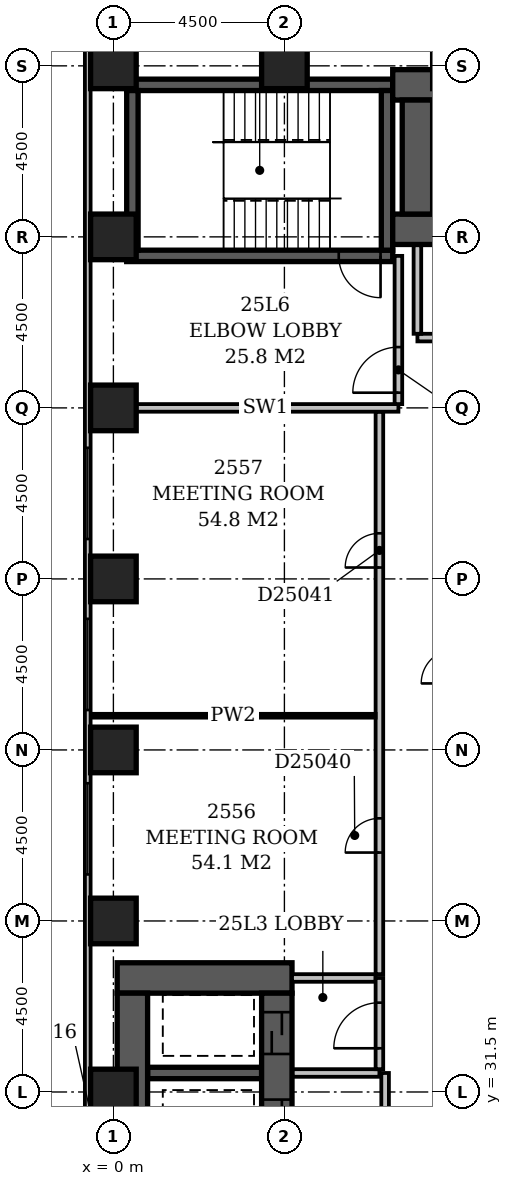
"""IFC4 building model, lengths in metres.
Left out: names, types, materials, properties, quantities, classifications, styles, units other than length and angle.
Written with IfcOpenShell. Run it as: python <this file> out.ifc"""

import sys

from ifc_helpers import new_model, si_unit, direction, frame, frame_2d, origin, origin_2d, place, context, subcontext, project, spatial, rectangle, extrude, element, fill, save


model = new_model("IFC4")
c1 = context("Model", 3, precision=1e-05, world=origin(), true_north=direction((0.0, 1.0)))
c2 = subcontext(c1, "Body", "Model", "MODEL_VIEW")
j1 = project(units=[si_unit("LENGTHUNIT", "METRE"), si_unit("PLANEANGLEUNIT", "RADIAN")], contexts=[c1])
p1 = place(None, origin())
s1 = spatial("IfcSite", under=j1, at=p1, CompositionType="ELEMENT")
p2 = place(p1, origin())
s2 = spatial("IfcBuilding", under=s1, at=p2, CompositionType="ELEMENT")
p3 = place(p2, frame((0.0, 0.0, 101.0)))
s3 = spatial("IfcBuildingStorey", under=s2, at=p3, CompositionType="ELEMENT", Elevation=101.0)
p4 = place(p3, frame((0.1, 34.5, -0.3), z_axis=(0.0, 0.0, 1.0), x_axis=(1.0, 0.0, 0.0)))
e1 = element("IfcWall", 1, at=p4, inside=s3, PredefinedType="SHEAR", context=c2, shape_type="SweptSolid", body=[
    extrude(rectangle(XDim=4.6, YDim=0.8, at=frame_2d((2.3, 0.0))), origin(), (0.0, 0.0, 1.0), 3.6),
])
p5 = place(p3, frame((0.35, 53.5, -0.3), z_axis=(0.0, 0.0, 1.0), x_axis=(1.0, 0.0, 0.0)))
e2 = element("IfcWall", 2, at=p5, inside=s3, PredefinedType="SHEAR", context=c2, shape_type="SweptSolid", body=[
    extrude(rectangle(XDim=7.0, YDim=0.3, at=frame_2d((3.5, 0.0))), origin(), (0.0, 0.0, 1.0), 3.6),
])
p6 = place(p5, frame((5.58, 0.0, 0.3)))
e3 = element("IfcOpeningElement", 3, at=p6, cuts=e2, PredefinedType="OPENING", context=c2, shape_type="SweptSolid", body=[
    extrude(rectangle(XDim=1.1, YDim=2.1, at=frame_2d((0.55, 1.05))), frame((0.0, 0.162, 0.0), z_axis=(0.0, -1.0, 0.0), x_axis=(1.0, 0.0, 0.0)), (0.0, 0.0, 1.0), 0.324),
])
p7 = place(p3, frame((0.35, 58.0, -0.3), z_axis=(0.0, 0.0, 1.0), x_axis=(1.0, 0.0, 0.0)))
e4 = element("IfcWall", 4, at=p7, inside=s3, PredefinedType="SHEAR", context=c2, shape_type="SweptSolid", body=[
    extrude(rectangle(XDim=7.0, YDim=0.3, at=frame_2d((3.5, 0.0))), origin(), (0.0, 0.0, 1.0), 3.6),
])
p8 = place(p3, frame((0.5, 27.15, -0.3), z_axis=(0.0, 0.0, 1.0), x_axis=(0.0, 1.0, 0.0)))
e5 = element("IfcWall", 5, at=p8, inside=s3, PredefinedType="SHEAR", context=c2, shape_type="SweptSolid", body=[
    extrude(rectangle(XDim=6.95, YDim=0.8, at=frame_2d((3.475, 0.0))), origin(), (0.0, 0.0, 1.0), 3.6),
])
p9 = place(p3, frame((0.5, 53.65, -0.3), z_axis=(0.0, 0.0, 1.0), x_axis=(0.0, 1.0, 0.0)))
e6 = element("IfcWall", 6, at=p9, inside=s3, PredefinedType="SHEAR", context=c2, shape_type="SweptSolid", body=[
    extrude(rectangle(XDim=4.2, YDim=0.3, at=frame_2d((2.1, 0.0))), origin(), (0.0, 0.0, 1.0), 3.6),
])
p10 = place(p3, frame((0.9, 32.0, -0.3), z_axis=(0.0, 0.0, 1.0), x_axis=(1.0, 0.0, 0.0)))
e7 = element("IfcWall", 7, at=p10, inside=s3, PredefinedType="SHEAR", context=c2, shape_type="SweptSolid", body=[
    extrude(rectangle(XDim=3.0, YDim=0.3, at=frame_2d((1.5, 0.0))), origin(), (0.0, 0.0, 1.0), 3.6),
])
p11 = place(p3, frame((4.3, 27.15, -0.3), z_axis=(0.0, 0.0, 1.0), x_axis=(0.0, 1.0, 0.0)))
e8 = element("IfcWall", 8, at=p11, inside=s3, PredefinedType="SHEAR", context=c2, shape_type="SweptSolid", body=[
    extrude(rectangle(XDim=6.95, YDim=0.8, at=frame_2d((3.475, 0.0))), origin(), (0.0, 0.0, 1.0), 3.6),
])
p12 = place(p11, frame((3.05, 0.0, 0.3)))
e9 = element("IfcOpeningElement", 9, at=p12, cuts=e8, PredefinedType="OPENING", context=c2, shape_type="SweptSolid", body=[
    extrude(rectangle(XDim=1.1, YDim=2.1, at=frame_2d((0.55, 1.05))), frame((0.0, 0.412, 0.0), z_axis=(0.0, -1.0, 0.0), x_axis=(1.0, 0.0, 0.0)), (0.0, 0.0, 1.0), 0.824),
])
p13 = place(p11, frame((0.55, 0.0, 0.3)))
e10 = element("IfcOpeningElement", 10, at=p13, cuts=e8, PredefinedType="OPENING", context=c2, shape_type="SweptSolid", body=[
    extrude(rectangle(XDim=1.1, YDim=2.1, at=frame_2d((0.55, 1.05))), frame((0.0, 0.412, 0.0), z_axis=(0.0, -1.0, 0.0), x_axis=(1.0, 0.0, 0.0)), (0.0, 0.0, 1.0), 0.824),
])
p14 = place(p11, frame((5.35, 0.0, 0.3)))
e11 = element("IfcOpeningElement", 11, at=p14, cuts=e8, PredefinedType="OPENING", context=c2, shape_type="SweptSolid", body=[
    extrude(rectangle(XDim=1.1, YDim=2.1, at=frame_2d((0.55, 1.05))), frame((0.0, 0.412, 0.0), z_axis=(0.0, -1.0, 0.0), x_axis=(1.0, 0.0, 0.0)), (0.0, 0.0, 1.0), 0.824),
])
p15 = place(p3, frame((7.2, 53.65, -0.3), z_axis=(0.0, 0.0, 1.0), x_axis=(0.0, 1.0, 0.0)))
e12 = element("IfcWall", 12, at=p15, inside=s3, PredefinedType="SHEAR", context=c2, shape_type="SweptSolid", body=[
    extrude(rectangle(XDim=4.2, YDim=0.3, at=frame_2d((2.1, 0.0))), origin(), (0.0, 0.0, 1.0), 3.6),
])
p16 = place(p3, frame((7.35, 54.2, -0.3), z_axis=(0.0, 0.0, 1.0), x_axis=(1.0, 0.0, 0.0)))
e13 = element("IfcWall", 13, at=p16, inside=s3, PredefinedType="SHEAR", context=c2, shape_type="SweptSolid", body=[
    extrude(rectangle(XDim=16.45, YDim=0.8, at=frame_2d((8.225, 0.0))), origin(), (0.0, 0.0, 1.0), 3.6),
])
p17 = place(p16, frame((1.35, 0.0, 0.3)))
e14 = element("IfcOpeningElement", 14, at=p17, cuts=e13, PredefinedType="OPENING", context=c2, shape_type="SweptSolid", body=[
    extrude(rectangle(XDim=1.1, YDim=2.1, at=frame_2d((0.55, 1.05))), frame((0.0, 0.412, 0.0), z_axis=(0.0, -1.0, 0.0), x_axis=(1.0, 0.0, 0.0)), (0.0, 0.0, 1.0), 0.824),
])
p18 = place(p16, frame((3.85, 0.0, 0.3)))
e15 = element("IfcOpeningElement", 15, at=p18, cuts=e13, PredefinedType="OPENING", context=c2, shape_type="SweptSolid", body=[
    extrude(rectangle(XDim=1.1, YDim=2.1, at=frame_2d((0.55, 1.05))), frame((0.0, 0.412, 0.0), z_axis=(0.0, -1.0, 0.0), x_axis=(1.0, 0.0, 0.0)), (0.0, 0.0, 1.0), 0.824),
])
p19 = place(p16, frame((6.35, 0.0, 0.3)))
e16 = element("IfcOpeningElement", 16, at=p19, cuts=e13, PredefinedType="OPENING", context=c2, shape_type="SweptSolid", body=[
    extrude(rectangle(XDim=1.1, YDim=2.1, at=frame_2d((0.55, 1.05))), frame((0.0, 0.412, 0.0), z_axis=(0.0, -1.0, 0.0), x_axis=(1.0, 0.0, 0.0)), (0.0, 0.0, 1.0), 0.824),
])
p20 = place(p16, frame((8.85, 0.0, 0.3)))
e17 = element("IfcOpeningElement", 17, at=p20, cuts=e13, PredefinedType="OPENING", context=c2, shape_type="SweptSolid", body=[
    extrude(rectangle(XDim=1.1, YDim=2.1, at=frame_2d((0.55, 1.05))), frame((0.0, 0.412, 0.0), z_axis=(0.0, -1.0, 0.0), x_axis=(1.0, 0.0, 0.0)), (0.0, 0.0, 1.0), 0.824),
])
p21 = place(p16, frame((11.35, 0.0, 0.3)))
e18 = element("IfcOpeningElement", 18, at=p21, cuts=e13, PredefinedType="OPENING", context=c2, shape_type="SweptSolid", body=[
    extrude(rectangle(XDim=1.1, YDim=2.1, at=frame_2d((0.55, 1.05))), frame((0.0, 0.412, 0.0), z_axis=(0.0, -1.0, 0.0), x_axis=(1.0, 0.0, 0.0)), (0.0, 0.0, 1.0), 0.824),
])
p22 = place(p16, frame((13.85, 0.0, 0.3)))
e19 = element("IfcOpeningElement", 19, at=p22, cuts=e13, PredefinedType="OPENING", context=c2, shape_type="SweptSolid", body=[
    extrude(rectangle(XDim=1.1, YDim=2.1, at=frame_2d((0.55, 1.05))), frame((0.0, 0.412, 0.0), z_axis=(0.0, -1.0, 0.0), x_axis=(1.0, 0.0, 0.0)), (0.0, 0.0, 1.0), 0.824),
])
p23 = place(p3, frame((7.35, 58.0, -0.3), z_axis=(0.0, 0.0, 1.0), x_axis=(1.0, 0.0, 0.0)))
e20 = element("IfcWall", 20, at=p23, inside=s3, PredefinedType="SHEAR", context=c2, shape_type="SweptSolid", body=[
    extrude(rectangle(XDim=16.45, YDim=0.8, at=frame_2d((8.225, 0.0))), origin(), (0.0, 0.0, 1.0), 3.6),
])
p24 = place(p3, frame((8.0, 54.6, -0.3), z_axis=(0.0, 0.0, 1.0), x_axis=(0.0, 1.0, 0.0)))
e21 = element("IfcWall", 21, at=p24, inside=s3, PredefinedType="SHEAR", context=c2, shape_type="SweptSolid", body=[
    extrude(rectangle(XDim=3.0, YDim=0.8, at=frame_2d((1.5, 0.0))), origin(), (0.0, 0.0, 1.0), 3.6),
])
for number, where, z_axis, x_axis in (
    (22, (0.0, 31.5, -0.3), (0.0, 0.0, 1.0), (1.0, 0.0, 0.0)),
    (23, (0.0, 36.0, -0.3), (0.0, 0.0, 1.0), (1.0, 0.0, 0.0)),
    (24, (0.0, 40.5, -0.3), (0.0, 0.0, 1.0), (1.0, 0.0, 0.0)),
    (25, (0.0, 45.0, -0.3), (0.0, 0.0, 1.0), (1.0, 0.0, 0.0)),
    (26, (0.0, 49.5, -0.3), (0.0, 0.0, 1.0), (1.0, 0.0, 0.0)),
    (27, (0.0, 54.0, -0.3), (0.0, 0.0, 1.0), (1.0, 0.0, 0.0)),
    (28, (0.0, 58.5, -0.3), (0.0, 0.0, 1.0), (1.0, 0.0, 0.0)),
    (29, (4.5, 58.5, -0.3), (0.0, 0.0, 1.0), (1.0, 0.0, 0.0)),
):
    element("IfcColumn", number, at=place(p3, frame(where, z_axis=z_axis, x_axis=x_axis)), inside=s3, PredefinedType="COLUMN", context=c2, shape_type="SweptSolid", body=[
        extrude(rectangle(XDim=1.2, YDim=1.2, at=origin_2d()), origin(), (0.0, 0.0, 1.0), 3.6),
    ])
p25 = place(p3, frame((-0.675, 59.1, 0.0), z_axis=(0.0, 0.0, 1.0), x_axis=(0.0, -1.0, 0.0)))
e30 = element("IfcWall", 30, at=p25, inside=s3, PredefinedType="STANDARD", context=c2, shape_type="SweptSolid", body=[
    extrude(rectangle(XDim=55.35, YDim=0.15, at=frame_2d((27.675, 0.0))), origin(), (0.0, 0.0, 1.0), 2.7),
])
p26 = place(p25, frame((10.65, 0.0, 0.6)))
e31 = element("IfcOpeningElement", 31, at=p26, cuts=e30, PredefinedType="OPENING", context=c2, shape_type="SweptSolid", body=[
    extrude(rectangle(XDim=2.4, YDim=1.8, at=frame_2d((1.2, 0.9))), frame((0.0, 0.087, 0.0), z_axis=(0.0, -1.0, 0.0), x_axis=(1.0, 0.0, 0.0)), (0.0, 0.0, 1.0), 0.174),
])
p27 = place(p25, frame((15.15, 0.0, 0.6)))
e32 = element("IfcOpeningElement", 32, at=p27, cuts=e30, PredefinedType="OPENING", context=c2, shape_type="SweptSolid", body=[
    extrude(rectangle(XDim=2.4, YDim=1.8, at=frame_2d((1.2, 0.9))), frame((0.0, 0.087, 0.0), z_axis=(0.0, -1.0, 0.0), x_axis=(1.0, 0.0, 0.0)), (0.0, 0.0, 1.0), 0.174),
])
p28 = place(p25, frame((19.476, 0.0, 0.6)))
e33 = element("IfcOpeningElement", 33, at=p28, cuts=e30, PredefinedType="OPENING", context=c2, shape_type="SweptSolid", body=[
    extrude(rectangle(XDim=2.4, YDim=1.8, at=frame_2d((1.2, 0.9))), frame((0.0, 0.087, 0.0), z_axis=(0.0, -1.0, 0.0), x_axis=(1.0, 0.0, 0.0)), (0.0, 0.0, 1.0), 0.174),
])
p29 = place(p3, frame((8.0, 51.35, 0.0), z_axis=(0.0, 0.0, 1.0), x_axis=(1.0, 0.0, 0.0)))
e34 = element("IfcWall", 34, at=p29, inside=s3, PredefinedType="PARTITIONING", context=c2, shape_type="SweptSolid", body=[
    extrude(rectangle(XDim=15.0, YDim=0.2, at=frame_2d((7.5, 0.0))), origin(), (0.0, 0.0, 1.0), 3.3),
])
p30 = place(p29, frame((3.4, 0.0, 0.0)))
e35 = element("IfcOpeningElement", 35, at=p30, cuts=e34, PredefinedType="OPENING", context=c2, shape_type="SweptSolid", body=[
    extrude(rectangle(XDim=1.2, YDim=2.1, at=frame_2d((0.6, 1.05))), frame((0.0, 0.112, 0.0), z_axis=(0.0, -1.0, 0.0), x_axis=(1.0, 0.0, 0.0)), (0.0, 0.0, 1.0), 0.224),
])
p31 = place(p29, frame((9.4, 0.0, 0.0)))
e36 = element("IfcOpeningElement", 36, at=p31, cuts=e34, PredefinedType="OPENING", context=c2, shape_type="SweptSolid", body=[
    extrude(rectangle(XDim=1.2, YDim=2.1, at=frame_2d((0.6, 1.05))), frame((0.0, 0.112, 0.0), z_axis=(0.0, -1.0, 0.0), x_axis=(1.0, 0.0, 0.0)), (0.0, 0.0, 1.0), 0.224),
])
p32 = place(p3, frame((8.0, 51.45, 0.0), z_axis=(0.0, 0.0, 1.0), x_axis=(0.0, 1.0, 0.0)))
e37 = element("IfcWall", 37, at=p32, inside=s3, PredefinedType="PARTITIONING", context=c2, shape_type="SweptSolid", body=[
    extrude(rectangle(XDim=2.33, YDim=0.2, at=frame_2d((1.165, 0.0))), origin(), (0.0, 0.0, 1.0), 3.3),
])
p33 = place(p3, frame((4.72, 32.0, 0.0), z_axis=(0.0, 0.0, 1.0), x_axis=(1.0, 0.0, 0.0)))
e38 = element("IfcWall", 38, at=p33, inside=s3, PredefinedType="PARTITIONING", context=c2, shape_type="SweptSolid", body=[
    extrude(rectangle(XDim=2.28, YDim=0.2, at=frame_2d((1.14, 0.0))), origin(), (0.0, 0.0, 1.0), 3.3),
])
p34 = place(p3, frame((7.0, 32.1, 0.0), z_axis=(0.0, 0.0, 1.0), x_axis=(0.0, 1.0, 0.0)))
e39 = element("IfcWall", 39, at=p34, inside=s3, PredefinedType="PARTITIONING", context=c2, shape_type="SweptSolid", body=[
    extrude(rectangle(XDim=2.4, YDim=0.2, at=frame_2d((1.2, 0.0))), origin(), (0.0, 0.0, 1.0), 3.3),
])
p35 = place(p34, frame((0.55, 0.0, 0.0)))
e40 = element("IfcOpeningElement", 40, at=p35, cuts=e39, PredefinedType="OPENING", context=c2, shape_type="SweptSolid", body=[
    extrude(rectangle(XDim=1.2, YDim=2.1, at=frame_2d((0.6, 1.05))), frame((0.0, 0.112, 0.0), z_axis=(0.0, -1.0, 0.0), x_axis=(1.0, 0.0, 0.0)), (0.0, 0.0, 1.0), 0.224),
])
p36 = place(p3, frame((4.7, 34.5, 0.0), z_axis=(0.0, 0.0, 1.0), x_axis=(1.0, 0.0, 0.0)))
e41 = element("IfcWall", 41, at=p36, inside=s3, PredefinedType="PARTITIONING", context=c2, shape_type="SweptSolid", body=[
    extrude(rectangle(XDim=2.2, YDim=0.2, at=frame_2d((1.1, 0.0))), origin(), (0.0, 0.0, 1.0), 3.3),
])
p37 = place(p3, frame((7.15, 27.17, 0.0), z_axis=(0.0, 0.0, 1.0), x_axis=(0.0, 1.0, 0.0)))
e42 = element("IfcWall", 42, at=p37, inside=s3, PredefinedType="PARTITIONING", context=c2, shape_type="SweptSolid", body=[
    extrude(rectangle(XDim=4.83, YDim=0.2, at=frame_2d((2.415, 0.0))), origin(), (0.0, 0.0, 1.0), 3.3),
])
p38 = place(p37, frame((1.73, 0.0, 0.0)))
e43 = element("IfcOpeningElement", 43, at=p38, cuts=e42, PredefinedType="OPENING", context=c2, shape_type="SweptSolid", body=[
    extrude(rectangle(XDim=1.2, YDim=2.1, at=frame_2d((0.6, 1.05))), frame((0.0, 0.112, 0.0), z_axis=(0.0, -1.0, 0.0), x_axis=(1.0, 0.0, 0.0)), (0.0, 0.0, 1.0), 0.224),
])
p39 = place(p3, frame((0.5, 49.5, 0.0), z_axis=(0.0, 0.0, 1.0), x_axis=(1.0, 0.0, 0.0)))
e44 = element("IfcWall", 44, at=p39, inside=s3, PredefinedType="PARTITIONING", context=c2, shape_type="SweptSolid", body=[
    extrude(rectangle(XDim=7.0, YDim=0.2, at=frame_2d((3.5, 0.0))), origin(), (0.0, 0.0, 1.0), 3.3),
])
p40 = place(p3, frame((7.5, 49.6, 0.0), z_axis=(0.0, 0.0, 1.0), x_axis=(0.0, 1.0, 0.0)))
e45 = element("IfcWall", 45, at=p40, inside=s3, PredefinedType="PARTITIONING", context=c2, shape_type="SweptSolid", body=[
    extrude(rectangle(XDim=3.9, YDim=0.2, at=frame_2d((1.95, 0.0))), origin(), (0.0, 0.0, 1.0), 3.3),
])
p41 = place(p40, frame((0.3, 0.0, 0.0)))
e46 = element("IfcOpeningElement", 46, at=p41, cuts=e45, PredefinedType="OPENING", context=c2, shape_type="SweptSolid", body=[
    extrude(rectangle(XDim=1.2, YDim=2.1, at=frame_2d((0.6, 1.05))), frame((0.0, 0.112, 0.0), z_axis=(0.0, -1.0, 0.0), x_axis=(1.0, 0.0, 0.0)), (0.0, 0.0, 1.0), 0.224),
])
p42 = place(p3, frame((7.0, 34.6, 0.0), z_axis=(0.0, 0.0, 1.0), x_axis=(0.0, 1.0, 0.0)))
e47 = element("IfcWall", 47, at=p42, inside=s3, PredefinedType="PARTITIONING", context=c2, shape_type="SweptSolid", body=[
    extrude(rectangle(XDim=14.8, YDim=0.2, at=frame_2d((7.4, 0.0))), origin(), (0.0, 0.0, 1.0), 3.3),
])
p43 = place(p42, frame((3.2, 0.0, 0.0)))
e48 = element("IfcOpeningElement", 48, at=p43, cuts=e47, PredefinedType="OPENING", context=c2, shape_type="SweptSolid", body=[
    extrude(rectangle(XDim=0.9, YDim=2.1, at=frame_2d((0.45, 1.05))), frame((0.0, 0.112, 0.0), z_axis=(0.0, -1.0, 0.0), x_axis=(1.0, 0.0, 0.0)), (0.0, 0.0, 1.0), 0.224),
])
p44 = place(p42, frame((10.7, 0.0, 0.0)))
e49 = element("IfcOpeningElement", 49, at=p44, cuts=e47, PredefinedType="OPENING", context=c2, shape_type="SweptSolid", body=[
    extrude(rectangle(XDim=0.9, YDim=2.1, at=frame_2d((0.45, 1.05))), frame((0.0, 0.112, 0.0), z_axis=(0.0, -1.0, 0.0), x_axis=(1.0, 0.0, 0.0)), (0.0, 0.0, 1.0), 0.224),
])
p45 = place(p3, frame((-0.6, 41.4, 0.0), z_axis=(0.0, 0.0, 1.0), x_axis=(1.0, 0.0, 0.0)))
e50 = element("IfcWall", 50, at=p45, inside=s3, PredefinedType="PARTITIONING", context=c2, shape_type="SweptSolid", body=[
    extrude(rectangle(XDim=7.5, YDim=0.1, at=frame_2d((3.75, 0.0))), origin(), (0.0, 0.0, 1.0), 3.3),
])
p46 = place(p26, origin())
e51 = element("IfcWindow", 51, at=p46, inside=s3, PartitioningType="SINGLE_PANEL", PredefinedType="WINDOW", context=c2, shape_type="SweptSolid", body=[
    extrude(rectangle(XDim=2.4, YDim=1.8, at=frame_2d((1.2, 0.9))), frame((0.0, 0.03, 0.0), z_axis=(0.0, -1.0, 0.0), x_axis=(1.0, 0.0, 0.0)), (0.0, 0.0, 1.0), 0.06),
])
fill(e31, e51)
p47 = place(p27, origin())
e52 = element("IfcWindow", 52, at=p47, inside=s3, PartitioningType="SINGLE_PANEL", PredefinedType="WINDOW", context=c2, shape_type="SweptSolid", body=[
    extrude(rectangle(XDim=2.4, YDim=1.8, at=frame_2d((1.2, 0.9))), frame((0.0, 0.03, 0.0), z_axis=(0.0, -1.0, 0.0), x_axis=(1.0, 0.0, 0.0)), (0.0, 0.0, 1.0), 0.06),
])
fill(e32, e52)
p48 = place(p28, origin())
e53 = element("IfcWindow", 53, at=p48, inside=s3, PartitioningType="SINGLE_PANEL", PredefinedType="WINDOW", context=c2, shape_type="SweptSolid", body=[
    extrude(rectangle(XDim=2.4, YDim=1.8, at=frame_2d((1.2, 0.9))), frame((0.0, 0.03, 0.0), z_axis=(0.0, -1.0, 0.0), x_axis=(1.0, 0.0, 0.0)), (0.0, 0.0, 1.0), 0.06),
])
fill(e33, e53)
p49 = place(p41, origin())
e54 = element("IfcDoor", 54, at=p49, inside=s3, OperationType="SINGLE_SWING_LEFT", PredefinedType="DOOR", context=c2, shape_type="SweptSolid", body=[
    extrude(rectangle(XDim=1.2, YDim=2.1, at=frame_2d((0.6, 1.05))), frame((0.0, 0.025, 0.0), z_axis=(0.0, -1.0, 0.0), x_axis=(1.0, 0.0, 0.0)), (0.0, 0.0, 1.0), 0.05),
])
fill(e46, e54)
p50 = place(p12, origin())
e55 = element("IfcDoor", 55, at=p50, inside=s3, OperationType="SLIDING_TO_LEFT", PredefinedType="DOOR", context=c2, shape_type="SweptSolid", body=[
    extrude(rectangle(XDim=1.1, YDim=2.1, at=frame_2d((0.55, 1.05))), frame((0.0, 0.025, 0.0), z_axis=(0.0, -1.0, 0.0), x_axis=(1.0, 0.0, 0.0)), (0.0, 0.0, 1.0), 0.05),
])
fill(e9, e55)
p51 = place(p35, origin())
e56 = element("IfcDoor", 56, at=p51, inside=s3, OperationType="SINGLE_SWING_LEFT", PredefinedType="DOOR", context=c2, shape_type="SweptSolid", body=[
    extrude(rectangle(XDim=1.2, YDim=2.1, at=frame_2d((0.6, 1.05))), frame((0.0, 0.025, 0.0), z_axis=(0.0, -1.0, 0.0), x_axis=(1.0, 0.0, 0.0)), (0.0, 0.0, 1.0), 0.05),
])
fill(e40, e56)
p52 = place(p14, origin())
e57 = element("IfcDoor", 57, at=p52, inside=s3, OperationType="SLIDING_TO_LEFT", PredefinedType="DOOR", context=c2, shape_type="SweptSolid", body=[
    extrude(rectangle(XDim=1.1, YDim=2.1, at=frame_2d((0.55, 1.05))), frame((0.0, 0.025, 0.0), z_axis=(0.0, -1.0, 0.0), x_axis=(1.0, 0.0, 0.0)), (0.0, 0.0, 1.0), 0.05),
])
fill(e11, e57)
p53 = place(p6, origin())
e58 = element("IfcDoor", 58, at=p53, inside=s3, OperationType="SINGLE_SWING_RIGHT", PredefinedType="DOOR", context=c2, shape_type="SweptSolid", body=[
    extrude(rectangle(XDim=1.1, YDim=2.1, at=frame_2d((0.55, 1.05))), frame((0.0, 0.025, 0.0), z_axis=(0.0, -1.0, 0.0), x_axis=(1.0, 0.0, 0.0)), (0.0, 0.0, 1.0), 0.05),
])
fill(e3, e58)
p54 = place(p43, origin())
e59 = element("IfcDoor", 59, at=p54, inside=s3, OperationType="SINGLE_SWING_LEFT", PredefinedType="DOOR", context=c2, shape_type="SweptSolid", body=[
    extrude(rectangle(XDim=0.9, YDim=2.1, at=frame_2d((0.45, 1.05))), frame((0.0, 0.025, 0.0), z_axis=(0.0, -1.0, 0.0), x_axis=(1.0, 0.0, 0.0)), (0.0, 0.0, 1.0), 0.05),
])
fill(e48, e59)
p55 = place(p44, origin())
e60 = element("IfcDoor", 60, at=p55, inside=s3, OperationType="SINGLE_SWING_LEFT", PredefinedType="DOOR", context=c2, shape_type="SweptSolid", body=[
    extrude(rectangle(XDim=0.9, YDim=2.1, at=frame_2d((0.45, 1.05))), frame((0.0, 0.025, 0.0), z_axis=(0.0, -1.0, 0.0), x_axis=(1.0, 0.0, 0.0)), (0.0, 0.0, 1.0), 0.05),
])
fill(e49, e60)
save(model, sys.argv[1])
